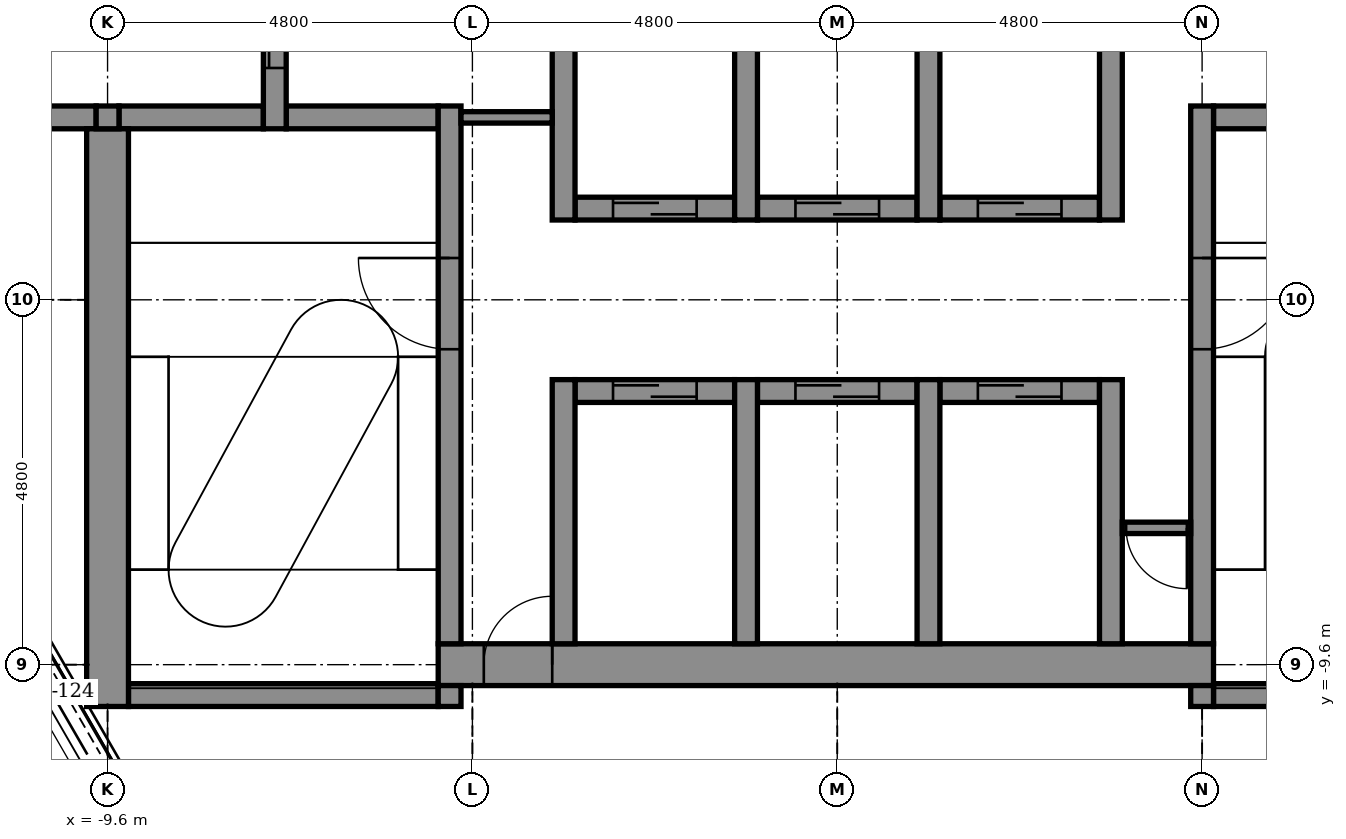
"""IFC4 building model, lengths in metres.
Left out: names, types, materials, properties, quantities, classifications, styles, units other than length and angle.
Written with IfcOpenShell. Run it as: python <this file> out.ifc"""

import sys

from ifc_helpers import new_model, si_unit, direction, frame, frame_2d, origin, place, context, subcontext, project, spatial, rectangle, extrude, element, fill, save


model = new_model("IFC4")
c1 = context("Model", 3, precision=1e-05, world=origin(), true_north=direction((0.0, 1.0)))
c2 = subcontext(c1, "Body", "Model", "MODEL_VIEW")
j1 = project(units=[si_unit("LENGTHUNIT", "METRE"), si_unit("PLANEANGLEUNIT", "RADIAN")], contexts=[c1])
p1 = place(None, origin())
s1 = spatial("IfcSite", under=j1, at=p1, CompositionType="ELEMENT")
p2 = place(p1, origin())
s2 = spatial("IfcBuilding", under=s1, at=p2, CompositionType="ELEMENT")
p3 = place(p2, frame((0.0, 0.0, 238.4)))
s3 = spatial("IfcBuildingStorey", under=s2, at=p3, CompositionType="ELEMENT", Elevation=238.4)
p4 = place(p3, frame((-9.325, -10.0, -0.15), z_axis=(0.0, 0.0, 1.0), x_axis=(1.0, 0.0, 0.0)))
e1 = element("IfcWall", 1, at=p4, inside=s3, PredefinedType="STANDARD", context=c2, shape_type="SweptSolid", body=[
    extrude(rectangle(XDim=4.075, YDim=0.3, at=frame_2d((2.038, 0.0))), origin(), (0.0, 0.0, 1.0), 3.9),
])
p5 = place(p3, frame((4.95, -10.0, -0.15), z_axis=(0.0, 0.0, 1.0), x_axis=(1.0, 0.0, 0.0)))
e2 = element("IfcWall", 2, at=p5, inside=s3, PredefinedType="STANDARD", context=c2, shape_type="SweptSolid", body=[
    extrude(rectangle(XDim=4.375, YDim=0.3, at=frame_2d((2.188, 0.0))), origin(), (0.0, 0.0, 1.0), 3.9),
])
p6 = place(p3, frame((-5.25, -9.6, -0.15), z_axis=(0.0, 0.0, 1.0), x_axis=(1.0, 0.0, 0.0)))
e3 = element("IfcWall", 3, at=p6, inside=s3, PredefinedType="SHEAR", context=c2, shape_type="SweptSolid", body=[
    extrude(rectangle(XDim=10.2, YDim=0.55, at=frame_2d((5.1, 0.0))), origin(), (0.0, 0.0, 1.0), 3.9),
])
p7 = place(p6, frame((0.6, 0.0, 0.15)))
e4 = element("IfcOpeningElement", 4, at=p7, cuts=e3, PredefinedType="OPENING", context=c2, shape_type="SweptSolid", body=[
    extrude(rectangle(XDim=0.9, YDim=2.1, at=frame_2d((0.45, 1.05))), frame((0.0, 0.285, 0.0), z_axis=(0.0, -1.0, 0.0), x_axis=(1.0, 0.0, 0.0)), (0.0, 0.0, 1.0), 0.57),
])
p8 = place(p3, frame((-3.45, -6.0, -0.15), z_axis=(0.0, 0.0, 1.0), x_axis=(1.0, 0.0, 0.0)))
e5 = element("IfcWall", 5, at=p8, inside=s3, PredefinedType="STANDARD", context=c2, shape_type="SweptSolid", body=[
    extrude(rectangle(XDim=2.1, YDim=0.3, at=frame_2d((1.05, 0.0))), origin(), (0.0, 0.0, 1.0), 3.9),
])
p9 = place(p8, frame((0.5, 0.0, 0.15)))
e6 = element("IfcOpeningElement", 6, at=p9, cuts=e5, PredefinedType="OPENING", context=c2, shape_type="SweptSolid", body=[
    extrude(rectangle(XDim=1.1, YDim=2.1, at=frame_2d((0.55, 1.05))), frame((0.0, 0.16, 0.0), z_axis=(0.0, -1.0, 0.0), x_axis=(1.0, 0.0, 0.0)), (0.0, 0.0, 1.0), 0.32),
])
p10 = place(p3, frame((-1.05, -6.0, -0.15), z_axis=(0.0, 0.0, 1.0), x_axis=(1.0, 0.0, 0.0)))
e7 = element("IfcWall", 7, at=p10, inside=s3, PredefinedType="STANDARD", context=c2, shape_type="SweptSolid", body=[
    extrude(rectangle(XDim=2.1, YDim=0.3, at=frame_2d((1.05, 0.0))), origin(), (0.0, 0.0, 1.0), 3.9),
])
p11 = place(p10, frame((0.5, 0.0, 0.15)))
e8 = element("IfcOpeningElement", 8, at=p11, cuts=e7, PredefinedType="OPENING", context=c2, shape_type="SweptSolid", body=[
    extrude(rectangle(XDim=1.1, YDim=2.1, at=frame_2d((0.55, 1.05))), frame((0.0, 0.16, 0.0), z_axis=(0.0, -1.0, 0.0), x_axis=(1.0, 0.0, 0.0)), (0.0, 0.0, 1.0), 0.32),
])
p12 = place(p3, frame((1.35, -6.0, -0.15), z_axis=(0.0, 0.0, 1.0), x_axis=(1.0, 0.0, 0.0)))
e9 = element("IfcWall", 9, at=p12, inside=s3, PredefinedType="STANDARD", context=c2, shape_type="SweptSolid", body=[
    extrude(rectangle(XDim=2.1, YDim=0.3, at=frame_2d((1.05, 0.0))), origin(), (0.0, 0.0, 1.0), 3.9),
])
p13 = place(p12, frame((0.5, 0.0, 0.15)))
e10 = element("IfcOpeningElement", 10, at=p13, cuts=e9, PredefinedType="OPENING", context=c2, shape_type="SweptSolid", body=[
    extrude(rectangle(XDim=1.1, YDim=2.1, at=frame_2d((0.55, 1.05))), frame((0.0, 0.16, 0.0), z_axis=(0.0, -1.0, 0.0), x_axis=(1.0, 0.0, 0.0)), (0.0, 0.0, 1.0), 0.32),
])
p14 = place(p3, frame((-3.45, -3.6, -0.15), z_axis=(0.0, 0.0, 1.0), x_axis=(1.0, 0.0, 0.0)))
e11 = element("IfcWall", 11, at=p14, inside=s3, PredefinedType="STANDARD", context=c2, shape_type="SweptSolid", body=[
    extrude(rectangle(XDim=2.1, YDim=0.3, at=frame_2d((1.05, 0.0))), origin(), (0.0, 0.0, 1.0), 3.9),
])
p15 = place(p14, frame((0.5, 0.0, 0.15)))
e12 = element("IfcOpeningElement", 12, at=p15, cuts=e11, PredefinedType="OPENING", context=c2, shape_type="SweptSolid", body=[
    extrude(rectangle(XDim=1.1, YDim=2.1, at=frame_2d((0.55, 1.05))), frame((0.0, 0.16, 0.0), z_axis=(0.0, -1.0, 0.0), x_axis=(1.0, 0.0, 0.0)), (0.0, 0.0, 1.0), 0.32),
])
p16 = place(p3, frame((-1.05, -3.6, -0.15), z_axis=(0.0, 0.0, 1.0), x_axis=(1.0, 0.0, 0.0)))
e13 = element("IfcWall", 13, at=p16, inside=s3, PredefinedType="STANDARD", context=c2, shape_type="SweptSolid", body=[
    extrude(rectangle(XDim=2.1, YDim=0.3, at=frame_2d((1.05, 0.0))), origin(), (0.0, 0.0, 1.0), 3.9),
])
p17 = place(p16, frame((0.5, 0.0, 0.15)))
e14 = element("IfcOpeningElement", 14, at=p17, cuts=e13, PredefinedType="OPENING", context=c2, shape_type="SweptSolid", body=[
    extrude(rectangle(XDim=1.1, YDim=2.1, at=frame_2d((0.55, 1.05))), frame((0.0, 0.16, 0.0), z_axis=(0.0, -1.0, 0.0), x_axis=(1.0, 0.0, 0.0)), (0.0, 0.0, 1.0), 0.32),
])
p18 = place(p3, frame((1.35, -3.6, -0.15), z_axis=(0.0, 0.0, 1.0), x_axis=(1.0, 0.0, 0.0)))
e15 = element("IfcWall", 15, at=p18, inside=s3, PredefinedType="STANDARD", context=c2, shape_type="SweptSolid", body=[
    extrude(rectangle(XDim=2.1, YDim=0.3, at=frame_2d((1.05, 0.0))), origin(), (0.0, 0.0, 1.0), 3.9),
])
p19 = place(p18, frame((0.5, 0.0, 0.15)))
e16 = element("IfcOpeningElement", 16, at=p19, cuts=e15, PredefinedType="OPENING", context=c2, shape_type="SweptSolid", body=[
    extrude(rectangle(XDim=1.1, YDim=2.1, at=frame_2d((0.55, 1.05))), frame((0.0, 0.16, 0.0), z_axis=(0.0, -1.0, 0.0), x_axis=(1.0, 0.0, 0.0)), (0.0, 0.0, 1.0), 0.32),
])
p20 = place(p3, frame((-10.85, -2.4, -0.15), z_axis=(0.0, 0.0, 1.0), x_axis=(1.0, 0.0, 0.0)))
e17 = element("IfcWall", 17, at=p20, inside=s3, PredefinedType="STANDARD", context=c2, shape_type="SweptSolid", body=[
    extrude(rectangle(XDim=1.1, YDim=0.3, at=frame_2d((0.55, 0.0))), origin(), (0.0, 0.0, 1.0), 3.9),
])
p21 = place(p3, frame((-9.45, -2.4, -0.15), z_axis=(0.0, 0.0, 1.0), x_axis=(1.0, 0.0, 0.0)))
e18 = element("IfcWall", 18, at=p21, inside=s3, PredefinedType="STANDARD", context=c2, shape_type="SweptSolid", body=[
    extrude(rectangle(XDim=1.9, YDim=0.3, at=frame_2d((0.95, 0.0))), origin(), (0.0, 0.0, 1.0), 3.9),
])
p22 = place(p3, frame((-7.25, -2.4, -0.15), z_axis=(0.0, 0.0, 1.0), x_axis=(1.0, 0.0, 0.0)))
e19 = element("IfcWall", 19, at=p22, inside=s3, PredefinedType="STANDARD", context=c2, shape_type="SweptSolid", body=[
    extrude(rectangle(XDim=2.0, YDim=0.3, at=frame_2d((1.0, 0.0))), origin(), (0.0, 0.0, 1.0), 3.9),
])
p23 = place(p3, frame((4.95, -2.4, -0.15), z_axis=(0.0, 0.0, 1.0), x_axis=(1.0, 0.0, 0.0)))
e20 = element("IfcWall", 20, at=p23, inside=s3, PredefinedType="STANDARD", context=c2, shape_type="SweptSolid", body=[
    extrude(rectangle(XDim=0.9, YDim=0.3, at=frame_2d((0.45, 0.0))), origin(), (0.0, 0.0, 1.0), 3.9),
])
p24 = place(p3, frame((-9.6, -10.15, -0.15), z_axis=(0.0, 0.0, 1.0), x_axis=(0.0, 1.0, 0.0)))
e21 = element("IfcWall", 21, at=p24, inside=s3, PredefinedType="SHEAR", context=c2, shape_type="SweptSolid", body=[
    extrude(rectangle(XDim=7.6, YDim=0.55, at=frame_2d((3.8, 0.0))), origin(), (0.0, 0.0, 1.0), 3.9),
])
p25 = place(p3, frame((-9.6, -2.55, -0.15), z_axis=(0.0, 0.0, 1.0), x_axis=(0.0, 1.0, 0.0)))
e22 = element("IfcWall", 22, at=p25, inside=s3, PredefinedType="STANDARD", context=c2, shape_type="SweptSolid", body=[
    extrude(rectangle(XDim=0.3, YDim=0.3, at=frame_2d((0.15, 0.0))), origin(), (0.0, 0.0, 1.0), 3.9),
])
p26 = place(p3, frame((-7.4, -2.55, -0.15), z_axis=(0.0, 0.0, 1.0), x_axis=(0.0, 1.0, 0.0)))
e23 = element("IfcWall", 23, at=p26, inside=s3, PredefinedType="STANDARD", context=c2, shape_type="SweptSolid", body=[
    extrude(rectangle(XDim=5.1, YDim=0.3, at=frame_2d((2.55, 0.0))), origin(), (0.0, 0.0, 1.0), 3.9),
])
p27 = place(p26, frame((0.8, 0.0, 0.15)))
e24 = element("IfcOpeningElement", 24, at=p27, cuts=e23, PredefinedType="OPENING", context=c2, shape_type="SweptSolid", body=[
    extrude(rectangle(XDim=1.1, YDim=2.1, at=frame_2d((0.55, 1.05))), frame((0.0, 0.16, 0.0), z_axis=(0.0, -1.0, 0.0), x_axis=(1.0, 0.0, 0.0)), (0.0, 0.0, 1.0), 0.32),
])
p28 = place(p26, frame((3.2, 0.0, 0.15)))
e25 = element("IfcOpeningElement", 25, at=p28, cuts=e23, PredefinedType="OPENING", context=c2, shape_type="SweptSolid", body=[
    extrude(rectangle(XDim=1.1, YDim=2.1, at=frame_2d((0.55, 1.05))), frame((0.0, 0.16, 0.0), z_axis=(0.0, -1.0, 0.0), x_axis=(1.0, 0.0, 0.0)), (0.0, 0.0, 1.0), 0.32),
])
p29 = place(p3, frame((-5.1, -10.15, -0.15), z_axis=(0.0, 0.0, 1.0), x_axis=(0.0, 1.0, 0.0)))
e26 = element("IfcWall", 26, at=p29, inside=s3, PredefinedType="STANDARD", context=c2, shape_type="SweptSolid", body=[
    extrude(rectangle(XDim=0.275, YDim=0.3, at=frame_2d((0.137, 0.0))), origin(), (0.0, 0.0, 1.0), 3.9),
])
p30 = place(p3, frame((-5.1, -9.325, -0.15), z_axis=(0.0, 0.0, 1.0), x_axis=(0.0, 1.0, 0.0)))
e27 = element("IfcWall", 27, at=p30, inside=s3, PredefinedType="STANDARD", context=c2, shape_type="SweptSolid", body=[
    extrude(rectangle(XDim=7.075, YDim=0.3, at=frame_2d((3.538, 0.0))), origin(), (0.0, 0.0, 1.0), 3.9),
])
p31 = place(p30, frame((3.875, 0.0, 0.15)))
e28 = element("IfcOpeningElement", 28, at=p31, cuts=e27, PredefinedType="OPENING", context=c2, shape_type="SweptSolid", body=[
    extrude(rectangle(XDim=1.2, YDim=2.1, at=frame_2d((0.6, 1.05))), frame((0.0, 0.16, 0.0), z_axis=(0.0, -1.0, 0.0), x_axis=(1.0, 0.0, 0.0)), (0.0, 0.0, 1.0), 0.32),
])
p32 = place(p3, frame((-3.6, -9.325, -0.15), z_axis=(0.0, 0.0, 1.0), x_axis=(0.0, 1.0, 0.0)))
e29 = element("IfcWall", 29, at=p32, inside=s3, PredefinedType="STANDARD", context=c2, shape_type="SweptSolid", body=[
    extrude(rectangle(XDim=3.475, YDim=0.3, at=frame_2d((1.737, 0.0))), origin(), (0.0, 0.0, 1.0), 3.9),
])
p33 = place(p3, frame((-3.6, -3.75, -0.15), z_axis=(0.0, 0.0, 1.0), x_axis=(0.0, 1.0, 0.0)))
e30 = element("IfcWall", 30, at=p33, inside=s3, PredefinedType="STANDARD", context=c2, shape_type="SweptSolid", body=[
    extrude(rectangle(XDim=7.5, YDim=0.3, at=frame_2d((3.75, 0.0))), origin(), (0.0, 0.0, 1.0), 3.9),
])
p34 = place(p3, frame((-1.2, -9.325, -0.15), z_axis=(0.0, 0.0, 1.0), x_axis=(0.0, 1.0, 0.0)))
e31 = element("IfcWall", 31, at=p34, inside=s3, PredefinedType="STANDARD", context=c2, shape_type="SweptSolid", body=[
    extrude(rectangle(XDim=3.475, YDim=0.3, at=frame_2d((1.737, 0.0))), origin(), (0.0, 0.0, 1.0), 3.9),
])
p35 = place(p3, frame((-1.2, -3.75, -0.15), z_axis=(0.0, 0.0, 1.0), x_axis=(0.0, 1.0, 0.0)))
e32 = element("IfcWall", 32, at=p35, inside=s3, PredefinedType="STANDARD", context=c2, shape_type="SweptSolid", body=[
    extrude(rectangle(XDim=7.5, YDim=0.3, at=frame_2d((3.75, 0.0))), origin(), (0.0, 0.0, 1.0), 3.9),
])
p36 = place(p3, frame((1.2, -9.325, -0.15), z_axis=(0.0, 0.0, 1.0), x_axis=(0.0, 1.0, 0.0)))
e33 = element("IfcWall", 33, at=p36, inside=s3, PredefinedType="STANDARD", context=c2, shape_type="SweptSolid", body=[
    extrude(rectangle(XDim=3.475, YDim=0.3, at=frame_2d((1.737, 0.0))), origin(), (0.0, 0.0, 1.0), 3.9),
])
p37 = place(p3, frame((1.2, -3.75, -0.15), z_axis=(0.0, 0.0, 1.0), x_axis=(0.0, 1.0, 0.0)))
e34 = element("IfcWall", 34, at=p37, inside=s3, PredefinedType="STANDARD", context=c2, shape_type="SweptSolid", body=[
    extrude(rectangle(XDim=7.5, YDim=0.3, at=frame_2d((3.75, 0.0))), origin(), (0.0, 0.0, 1.0), 3.9),
])
p38 = place(p3, frame((3.6, -9.325, -0.15), z_axis=(0.0, 0.0, 1.0), x_axis=(0.0, 1.0, 0.0)))
e35 = element("IfcWall", 35, at=p38, inside=s3, PredefinedType="STANDARD", context=c2, shape_type="SweptSolid", body=[
    extrude(rectangle(XDim=3.475, YDim=0.3, at=frame_2d((1.737, 0.0))), origin(), (0.0, 0.0, 1.0), 3.9),
])
p39 = place(p3, frame((3.6, -3.75, -0.15), z_axis=(0.0, 0.0, 1.0), x_axis=(0.0, 1.0, 0.0)))
e36 = element("IfcWall", 36, at=p39, inside=s3, PredefinedType="STANDARD", context=c2, shape_type="SweptSolid", body=[
    extrude(rectangle(XDim=7.5, YDim=0.3, at=frame_2d((3.75, 0.0))), origin(), (0.0, 0.0, 1.0), 3.9),
])
p40 = place(p3, frame((4.8, -10.15, -0.15), z_axis=(0.0, 0.0, 1.0), x_axis=(0.0, 1.0, 0.0)))
e37 = element("IfcWall", 37, at=p40, inside=s3, PredefinedType="STANDARD", context=c2, shape_type="SweptSolid", body=[
    extrude(rectangle(XDim=0.275, YDim=0.3, at=frame_2d((0.137, 0.0))), origin(), (0.0, 0.0, 1.0), 3.9),
])
p41 = place(p3, frame((4.8, -9.325, -0.15), z_axis=(0.0, 0.0, 1.0), x_axis=(0.0, 1.0, 0.0)))
e38 = element("IfcWall", 38, at=p41, inside=s3, PredefinedType="STANDARD", context=c2, shape_type="SweptSolid", body=[
    extrude(rectangle(XDim=7.075, YDim=0.3, at=frame_2d((3.538, 0.0))), origin(), (0.0, 0.0, 1.0), 3.9),
])
p42 = place(p41, frame((3.875, 0.0, 0.15)))
e39 = element("IfcOpeningElement", 39, at=p42, cuts=e38, PredefinedType="OPENING", context=c2, shape_type="SweptSolid", body=[
    extrude(rectangle(XDim=1.2, YDim=2.1, at=frame_2d((0.6, 1.05))), frame((0.0, 0.16, 0.0), z_axis=(0.0, -1.0, 0.0), x_axis=(1.0, 0.0, 0.0)), (0.0, 0.0, 1.0), 0.32),
])
p43 = place(p3, frame((3.75, -7.8, 0.0), z_axis=(0.0, 0.0, 1.0), x_axis=(1.0, 0.0, 0.0)))
e40 = element("IfcWall", 40, at=p43, inside=s3, PredefinedType="PARTITIONING", context=c2, shape_type="SweptSolid", body=[
    extrude(rectangle(XDim=0.9, YDim=0.15, at=frame_2d((0.45, 0.0))), origin(), (0.0, 0.0, 1.0), 3.75),
])
p44 = place(p43, frame((0.05, 0.0, 0.0)))
e41 = element("IfcOpeningElement", 41, at=p44, cuts=e40, PredefinedType="OPENING", context=c2, shape_type="SweptSolid", body=[
    extrude(rectangle(XDim=0.8, YDim=2.1, at=frame_2d((0.4, 1.05))), frame((0.0, 0.085, 0.0), z_axis=(0.0, -1.0, 0.0), x_axis=(1.0, 0.0, 0.0)), (0.0, 0.0, 1.0), 0.17),
])
p45 = place(p3, frame((-4.95, -2.4, 0.0), z_axis=(0.0, 0.0, 1.0), x_axis=(1.0, 0.0, 0.0)))
e42 = element("IfcWall", 42, at=p45, inside=s3, PredefinedType="PARTITIONING", context=c2, shape_type="SweptSolid", body=[
    extrude(rectangle(XDim=1.2, YDim=0.15, at=frame_2d((0.6, 0.0))), origin(), (0.0, 0.0, 1.0), 3.75),
])
p46 = place(p44, frame((0.8, 0.0, 0.0), z_axis=(0.0, 0.0, 1.0), x_axis=(-1.0, 0.0, 0.0)))
e43 = element("IfcDoor", 43, at=p46, inside=s3, OperationType="SINGLE_SWING_RIGHT", PredefinedType="DOOR", context=c2, shape_type="SweptSolid", body=[
    extrude(rectangle(XDim=0.8, YDim=2.1, at=frame_2d((0.4, 1.05))), frame((0.0, 0.025, 0.0), z_axis=(0.0, -1.0, 0.0), x_axis=(1.0, 0.0, 0.0)), (0.0, 0.0, 1.0), 0.05),
])
fill(e41, e43)
p47 = place(p27, origin())
e44 = element("IfcDoor", 44, at=p47, inside=s3, OperationType="DOUBLE_DOOR_SLIDING", PredefinedType="DOOR", context=c2, shape_type="SweptSolid", body=[
    extrude(rectangle(XDim=1.1, YDim=2.1, at=frame_2d((0.55, 1.05))), frame((0.0, 0.025, 0.0), z_axis=(0.0, -1.0, 0.0), x_axis=(1.0, 0.0, 0.0)), (0.0, 0.0, 1.0), 0.05),
])
fill(e24, e44)
p48 = place(p15, origin())
e45 = element("IfcDoor", 45, at=p48, inside=s3, OperationType="DOUBLE_DOOR_SLIDING", PredefinedType="DOOR", context=c2, shape_type="SweptSolid", body=[
    extrude(rectangle(XDim=1.1, YDim=2.1, at=frame_2d((0.55, 1.05))), frame((0.0, 0.025, 0.0), z_axis=(0.0, -1.0, 0.0), x_axis=(1.0, 0.0, 0.0)), (0.0, 0.0, 1.0), 0.05),
])
fill(e12, e45)
p49 = place(p17, origin())
e46 = element("IfcDoor", 46, at=p49, inside=s3, OperationType="DOUBLE_DOOR_SLIDING", PredefinedType="DOOR", context=c2, shape_type="SweptSolid", body=[
    extrude(rectangle(XDim=1.1, YDim=2.1, at=frame_2d((0.55, 1.05))), frame((0.0, 0.025, 0.0), z_axis=(0.0, -1.0, 0.0), x_axis=(1.0, 0.0, 0.0)), (0.0, 0.0, 1.0), 0.05),
])
fill(e14, e46)
p50 = place(p19, origin())
e47 = element("IfcDoor", 47, at=p50, inside=s3, OperationType="DOUBLE_DOOR_SLIDING", PredefinedType="DOOR", context=c2, shape_type="SweptSolid", body=[
    extrude(rectangle(XDim=1.1, YDim=2.1, at=frame_2d((0.55, 1.05))), frame((0.0, 0.025, 0.0), z_axis=(0.0, -1.0, 0.0), x_axis=(1.0, 0.0, 0.0)), (0.0, 0.0, 1.0), 0.05),
])
fill(e16, e47)
p51 = place(p9, origin())
e48 = element("IfcDoor", 48, at=p51, inside=s3, OperationType="DOUBLE_DOOR_SLIDING", PredefinedType="DOOR", context=c2, shape_type="SweptSolid", body=[
    extrude(rectangle(XDim=1.1, YDim=2.1, at=frame_2d((0.55, 1.05))), frame((0.0, 0.025, 0.0), z_axis=(0.0, -1.0, 0.0), x_axis=(1.0, 0.0, 0.0)), (0.0, 0.0, 1.0), 0.05),
])
fill(e6, e48)
p52 = place(p11, origin())
e49 = element("IfcDoor", 49, at=p52, inside=s3, OperationType="DOUBLE_DOOR_SLIDING", PredefinedType="DOOR", context=c2, shape_type="SweptSolid", body=[
    extrude(rectangle(XDim=1.1, YDim=2.1, at=frame_2d((0.55, 1.05))), frame((0.0, 0.025, 0.0), z_axis=(0.0, -1.0, 0.0), x_axis=(1.0, 0.0, 0.0)), (0.0, 0.0, 1.0), 0.05),
])
fill(e8, e49)
p53 = place(p13, origin())
e50 = element("IfcDoor", 50, at=p53, inside=s3, OperationType="DOUBLE_DOOR_SLIDING", PredefinedType="DOOR", context=c2, shape_type="SweptSolid", body=[
    extrude(rectangle(XDim=1.1, YDim=2.1, at=frame_2d((0.55, 1.05))), frame((0.0, 0.025, 0.0), z_axis=(0.0, -1.0, 0.0), x_axis=(1.0, 0.0, 0.0)), (0.0, 0.0, 1.0), 0.05),
])
fill(e10, e50)
p54 = place(p31, origin())
e51 = element("IfcDoor", 51, at=p54, inside=s3, OperationType="SINGLE_SWING_RIGHT", PredefinedType="DOOR", context=c2, shape_type="SweptSolid", body=[
    extrude(rectangle(XDim=1.2, YDim=2.1, at=frame_2d((0.6, 1.05))), frame((0.0, 0.025, 0.0), z_axis=(0.0, -1.0, 0.0), x_axis=(1.0, 0.0, 0.0)), (0.0, 0.0, 1.0), 0.05),
])
fill(e28, e51)
p55 = place(p42, frame((1.2, 0.0, 0.0), z_axis=(0.0, 0.0, 1.0), x_axis=(-1.0, 0.0, 0.0)))
e52 = element("IfcDoor", 52, at=p55, inside=s3, OperationType="SINGLE_SWING_RIGHT", PredefinedType="DOOR", context=c2, shape_type="SweptSolid", body=[
    extrude(rectangle(XDim=1.2, YDim=2.1, at=frame_2d((0.6, 1.05))), frame((0.0, 0.025, 0.0), z_axis=(0.0, -1.0, 0.0), x_axis=(1.0, 0.0, 0.0)), (0.0, 0.0, 1.0), 0.05),
])
fill(e39, e52)
p56 = place(p7, origin())
e53 = element("IfcDoor", 53, at=p56, inside=s3, OperationType="SINGLE_SWING_RIGHT", PredefinedType="DOOR", context=c2, shape_type="SweptSolid", body=[
    extrude(rectangle(XDim=0.9, YDim=2.1, at=frame_2d((0.45, 1.05))), frame((0.0, 0.025, 0.0), z_axis=(0.0, -1.0, 0.0), x_axis=(1.0, 0.0, 0.0)), (0.0, 0.0, 1.0), 0.05),
])
fill(e4, e53)
save(model, sys.argv[1])
